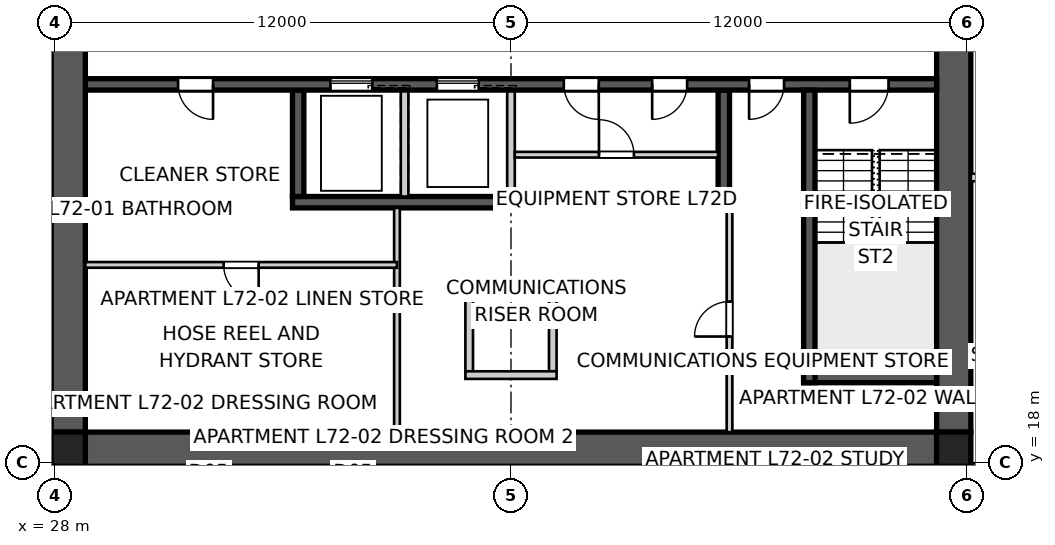
"""IFC4 building model, lengths in metres.
Left out: names, types, materials, properties, quantities, classifications, styles, units other than length and angle.
Written with IfcOpenShell. Run it as: python <this file> out.ifc"""

import sys

from ifc_helpers import new_model, si_unit, direction, frame, frame_2d, origin, origin_2d, place, context, subcontext, project, spatial, polyline, rectangle, outline, extrude, element, fill, save


model = new_model("IFC4")
c1 = context("Model", 3, precision=1e-05, world=origin(), true_north=direction((0.0, 1.0)))
c2 = subcontext(c1, "Body", "Model", "MODEL_VIEW")
j1 = project(units=[si_unit("LENGTHUNIT", "METRE"), si_unit("PLANEANGLEUNIT", "RADIAN")], contexts=[c1])
p1 = place(None, origin())
s1 = spatial("IfcSite", under=j1, at=p1, CompositionType="ELEMENT")
p2 = place(p1, origin())
s2 = spatial("IfcBuilding", under=s1, at=p2, CompositionType="ELEMENT")
p3 = place(p2, frame((0.0, 0.0, 260.8)))
s3 = spatial("IfcBuildingStorey", under=s2, at=p3, CompositionType="ELEMENT", Elevation=260.8)
p4 = place(p3, frame((51.2, 18.35, 0.0), z_axis=(0.0, 0.0, 1.0), x_axis=(-1.0, 0.0, 0.0)))
e1 = element("IfcWall", 1, at=p4, inside=s3, PredefinedType="SHEAR", context=c2, shape_type="SweptSolid", body=[
    extrude(outline(polyline([(0.0, -0.45), (22.4, -0.45), (22.4, -0.025), (22.85, -0.025), (22.85, 0.025), (22.4, 0.025), (22.4, 0.45), (0.0, 0.45), (0.0, 0.025), (-0.45, 0.025), (-0.45, -0.025), (0.0, -0.025), (0.0, -0.45)])), origin(), (0.0, 0.0, 1.0), 3.4),
])
p5 = place(p3, frame((51.65, 18.8, 0.0), z_axis=(0.0, 0.0, 1.0), x_axis=(0.0, 1.0, 0.0)))
e2 = element("IfcWall", 2, at=p5, inside=s3, PredefinedType="SHEAR", context=c2, shape_type="SweptSolid", body=[
    extrude(outline(polyline([(0.0, -0.45), (22.4, -0.45), (22.4, -0.025), (22.85, -0.025), (22.85, 0.025), (22.4, 0.025), (22.4, 0.45), (0.0, 0.45), (0.0, 0.025), (-0.45, 0.025), (-0.45, -0.025), (0.0, -0.025), (0.0, -0.45)])), origin(), (0.0, 0.0, 1.0), 3.4),
])
p6 = place(p5, frame((11.14, 0.0, 0.0)))
e3 = element("IfcOpeningElement", 3, at=p6, cuts=e2, PredefinedType="OPENING", context=c2, shape_type="SweptSolid", body=[
    extrude(rectangle(XDim=1.02, YDim=2.4, at=frame_2d((0.51, 1.2))), frame((0.0, 0.46, 0.0), z_axis=(0.0, -1.0, 0.0), x_axis=(1.0, 0.0, 0.0)), (0.0, 0.0, 1.0), 0.92),
])
p7 = place(p3, frame((28.35, 41.2, 0.0), z_axis=(0.0, 0.0, 1.0), x_axis=(0.0, -1.0, 0.0)))
e4 = element("IfcWall", 4, at=p7, inside=s3, PredefinedType="SHEAR", context=c2, shape_type="SweptSolid", body=[
    extrude(outline(polyline([(0.0, -0.45), (22.4, -0.45), (22.4, -0.025), (22.85, -0.025), (22.85, 0.025), (22.4, 0.025), (22.4, 0.45), (0.0, 0.45), (0.0, 0.025), (-0.45, 0.025), (-0.45, -0.025), (0.0, -0.025), (0.0, -0.45)])), origin(), (0.0, 0.0, 1.0), 3.4),
])
p8 = place(p7, frame((11.14, 0.0, 0.0)))
e5 = element("IfcOpeningElement", 5, at=p8, cuts=e4, PredefinedType="OPENING", context=c2, shape_type="SweptSolid", body=[
    extrude(rectangle(XDim=1.02, YDim=2.4, at=frame_2d((0.51, 1.2))), frame((0.0, 0.46, 0.0), z_axis=(0.0, -1.0, 0.0), x_axis=(1.0, 0.0, 0.0)), (0.0, 0.0, 1.0), 0.92),
])
p9 = place(p3, frame((51.2, 27.95, 0.0), z_axis=(0.0, 0.0, 1.0), x_axis=(-1.0, 0.0, 0.0)))
e6 = element("IfcWall", 6, at=p9, inside=s3, PredefinedType="SHEAR", context=c2, shape_type="SweptSolid", body=[
    extrude(rectangle(XDim=22.4, YDim=0.3, at=frame_2d((11.2, 0.0))), origin(), (0.0, 0.0, 1.0), 3.4),
])
p10 = place(p9, frame((19.04, 0.0, 0.0)))
e7 = element("IfcOpeningElement", 7, at=p10, cuts=e6, PredefinedType="OPENING", context=c2, shape_type="SweptSolid", body=[
    extrude(rectangle(XDim=0.92, YDim=2.1, at=frame_2d((0.46, 1.05))), frame((0.0, 0.16, 0.0), z_axis=(0.0, -1.0, 0.0), x_axis=(1.0, 0.0, 0.0)), (0.0, 0.0, 1.0), 0.32),
])
p11 = place(p9, frame((1.265, 0.0, 0.0)))
e8 = element("IfcOpeningElement", 8, at=p11, cuts=e6, PredefinedType="OPENING", context=c2, shape_type="SweptSolid", body=[
    extrude(rectangle(XDim=1.02, YDim=2.1, at=frame_2d((0.51, 1.05))), frame((0.0, 0.16, 0.0), z_axis=(0.0, -1.0, 0.0), x_axis=(1.0, 0.0, 0.0)), (0.0, 0.0, 1.0), 0.32),
])
p12 = place(p9, frame((4.015, 0.0, 0.0)))
e9 = element("IfcOpeningElement", 9, at=p12, cuts=e6, PredefinedType="OPENING", context=c2, shape_type="SweptSolid", body=[
    extrude(rectangle(XDim=0.92, YDim=2.1, at=frame_2d((0.46, 1.05))), frame((0.0, 0.16, 0.0), z_axis=(0.0, -1.0, 0.0), x_axis=(1.0, 0.0, 0.0)), (0.0, 0.0, 1.0), 0.32),
])
p13 = place(p9, frame((8.89, 0.0, 0.0)))
e10 = element("IfcOpeningElement", 10, at=p13, cuts=e6, PredefinedType="OPENING", context=c2, shape_type="SweptSolid", body=[
    extrude(rectangle(XDim=0.92, YDim=2.1, at=frame_2d((0.46, 1.05))), frame((0.0, 0.16, 0.0), z_axis=(0.0, -1.0, 0.0), x_axis=(1.0, 0.0, 0.0)), (0.0, 0.0, 1.0), 0.32),
])
p14 = place(p9, frame((6.565, 0.0, 0.0)))
e11 = element("IfcOpeningElement", 11, at=p14, cuts=e6, PredefinedType="OPENING", context=c2, shape_type="SweptSolid", body=[
    extrude(rectangle(XDim=0.92, YDim=2.1, at=frame_2d((0.46, 1.05))), frame((0.0, 0.16, 0.0), z_axis=(0.0, -1.0, 0.0), x_axis=(1.0, 0.0, 0.0)), (0.0, 0.0, 1.0), 0.32),
])
p15 = place(p9, frame((12.05, 0.0, 0.0)))
e12 = element("IfcOpeningElement", 12, at=p15, cuts=e6, PredefinedType="OPENING", context=c2, shape_type="SweptSolid", body=[
    extrude(rectangle(XDim=1.1, YDim=2.1, at=frame_2d((0.55, 1.05))), frame((0.0, 0.16, 0.0), z_axis=(0.0, -1.0, 0.0), x_axis=(1.0, 0.0, 0.0)), (0.0, 0.0, 1.0), 0.32),
])
p16 = place(p9, frame((14.85, 0.0, 0.0)))
e13 = element("IfcOpeningElement", 13, at=p16, cuts=e6, PredefinedType="OPENING", context=c2, shape_type="SweptSolid", body=[
    extrude(rectangle(XDim=1.1, YDim=2.1, at=frame_2d((0.55, 1.05))), frame((0.0, 0.16, 0.0), z_axis=(0.0, -1.0, 0.0), x_axis=(1.0, 0.0, 0.0)), (0.0, 0.0, 1.0), 0.32),
])
p17 = place(p3, frame((45.75, 24.85, 0.0), z_axis=(0.0, 0.0, 1.0), x_axis=(-1.0, 0.0, 0.0)))
e14 = element("IfcWall", 14, at=p17, inside=s3, PredefinedType="SHEAR", context=c2, shape_type="SweptSolid", body=[
    extrude(rectangle(XDim=11.5, YDim=0.3, at=frame_2d((5.75, 0.0))), origin(), (0.0, 0.0, 1.0), 3.4),
])
p18 = place(p3, frame((45.6, 27.8, 0.0), z_axis=(0.0, 0.0, 1.0), x_axis=(0.0, -1.0, 0.0)))
e15 = element("IfcWall", 15, at=p18, inside=s3, PredefinedType="SHEAR", context=c2, shape_type="SweptSolid", body=[
    extrude(rectangle(XDim=2.8, YDim=0.3, at=frame_2d((1.4, 0.0))), origin(), (0.0, 0.0, 1.0), 3.4),
])
for number, where, z_axis, x_axis in (
    (16, (40.0, 27.8, 0.0), (0.0, 0.0, 1.0), (0.0, -1.0, 0.0)),
    (17, (37.2, 27.8, 0.0), (0.0, 0.0, 1.0), (0.0, -1.0, 0.0)),
):
    element("IfcWall", number, at=place(p3, frame(where, z_axis=z_axis, x_axis=x_axis)), inside=s3, PredefinedType="SOLIDWALL", context=c2, shape_type="SweptSolid", body=[
        extrude(rectangle(XDim=2.8, YDim=0.2, at=frame_2d((1.4, 0.0))), origin(), (0.0, 0.0, 1.0), 3.4),
    ])
p19 = place(p3, frame((34.4, 27.8, 0.0), z_axis=(0.0, 0.0, 1.0), x_axis=(0.0, -1.0, 0.0)))
e18 = element("IfcWall", 18, at=p19, inside=s3, PredefinedType="SHEAR", context=c2, shape_type="SweptSolid", body=[
    extrude(rectangle(XDim=2.8, YDim=0.3, at=frame_2d((1.4, 0.0))), origin(), (0.0, 0.0, 1.0), 3.4),
])
p20 = place(p3, frame((47.85, 27.8, 0.0), z_axis=(0.0, 0.0, 1.0), x_axis=(0.0, -1.0, 0.0)))
e19 = element("IfcWall", 19, at=p20, inside=s3, PredefinedType="SHEAR", context=c2, shape_type="SweptSolid", body=[
    extrude(rectangle(XDim=7.7, YDim=0.3, at=frame_2d((3.85, 0.0))), origin(), (0.0, 0.0, 1.0), 3.4),
])
p21 = place(p3, frame((51.2, 20.25, 0.0), z_axis=(0.0, 0.0, 1.0), x_axis=(-1.0, 0.0, 0.0)))
e20 = element("IfcWall", 20, at=p21, inside=s3, PredefinedType="SHEAR", context=c2, shape_type="SweptSolid", body=[
    extrude(rectangle(XDim=3.5, YDim=0.3, at=frame_2d((1.75, 0.0))), origin(), (0.0, 0.0, 1.0), 3.4),
])
for number, where, z_axis, x_axis in (
    (21, (38.9, 22.4, 0.0), (0.0, 0.0, 1.0), (0.0, -1.0, 0.0)),
    (22, (41.1, 22.4, 0.0), (0.0, 0.0, 1.0), (0.0, -1.0, 0.0)),
):
    element("IfcWall", number, at=place(p3, frame(where, z_axis=z_axis, x_axis=x_axis)), inside=s3, PredefinedType="SOLIDWALL", context=c2, shape_type="SweptSolid", body=[
        extrude(rectangle(XDim=2.0, YDim=0.2, at=frame_2d((1.0, 0.0))), origin(), (0.0, 0.0, 1.0), 3.4),
    ])
for number, where, z_axis, x_axis in (
    (23, (38.8, 22.5, 0.0), (0.0, 0.0, 1.0), (1.0, 0.0, 0.0)),
    (24, (38.8, 20.3, 0.0), (0.0, 0.0, 1.0), (1.0, 0.0, 0.0)),
):
    element("IfcWall", number, at=place(p3, frame(where, z_axis=z_axis, x_axis=x_axis)), inside=s3, PredefinedType="SOLIDWALL", context=c2, shape_type="SweptSolid", body=[
        extrude(rectangle(XDim=2.4, YDim=0.2, at=frame_2d((1.2, 0.0))), origin(), (0.0, 0.0, 1.0), 3.4),
    ])
for number, where, z_axis, x_axis in (
    (25, (28.35, 18.35, 0.0), (0.0, 0.0, 1.0), (1.0, 0.0, 0.0)),
    (26, (51.65, 18.35, 0.0), (0.0, 0.0, 1.0), (1.0, 0.0, 0.0)),
):
    element("IfcColumn", number, at=place(p3, frame(where, z_axis=z_axis, x_axis=x_axis)), inside=s3, PredefinedType="COLUMN", context=c2, shape_type="SweptSolid", body=[
        extrude(rectangle(XDim=0.9, YDim=0.9, at=origin_2d()), origin(), (0.0, 0.0, 1.0), 3.4),
    ])
p22 = place(p3, frame((52.1, 25.5, 0.0), z_axis=(0.0, 0.0, 1.0), x_axis=(1.0, 0.0, 0.0)))
e27 = element("IfcWall", 27, at=p22, inside=s3, PredefinedType="PARTITIONING", context=c2, shape_type="SweptSolid", body=[
    extrude(rectangle(XDim=2.5, YDim=0.2, at=frame_2d((1.25, 0.0))), origin(), (0.0, 0.0, 1.0), 3.25),
])
p23 = place(p3, frame((22.388, 17.668, 0.0), z_axis=(0.0, 0.0, 1.0), x_axis=(0.819161528122, 0.573562891796, 0.0)))
e28 = element("IfcWall", 28, at=p23, inside=s3, PredefinedType="PARTITIONING", context=c2, shape_type="SweptSolid", body=[
    extrude(rectangle(XDim=6.681, YDim=0.25, at=frame_2d((3.341, 0.0))), origin(), (0.0, 0.0, 1.0), 3.25),
])
p24 = place(p3, frame((45.75, 18.8, 0.0), z_axis=(0.0, 0.0, 1.0), x_axis=(0.0, 1.0, 0.0)))
e29 = element("IfcWall", 29, at=p24, inside=s3, PredefinedType="SOLIDWALL", context=c2, shape_type="SweptSolid", body=[
    extrude(rectangle(XDim=5.95, YDim=0.15, at=frame_2d((2.975, 0.0))), origin(), (0.0, 0.0, 1.0), 3.25),
])
p25 = place(p24, frame((2.515, 0.0, 0.0)))
e30 = element("IfcOpeningElement", 30, at=p25, cuts=e29, PredefinedType="OPENING", context=c2, shape_type="SweptSolid", body=[
    extrude(rectangle(XDim=0.92, YDim=2.1, at=frame_2d((0.46, 1.05))), frame((0.0, 0.085, 0.0), z_axis=(0.0, -1.0, 0.0), x_axis=(1.0, 0.0, 0.0)), (0.0, 0.0, 1.0), 0.17),
])
p26 = place(p3, frame((37.0, 18.8, 0.0), z_axis=(0.0, 0.0, 1.0), x_axis=(0.0, 1.0, 0.0)))
e31 = element("IfcWall", 31, at=p26, inside=s3, PredefinedType="SOLIDWALL", context=c2, shape_type="SweptSolid", body=[
    extrude(rectangle(XDim=5.9, YDim=0.15, at=frame_2d((2.95, 0.0))), origin(), (0.0, 0.0, 1.0), 3.25),
])
p27 = place(p3, frame((37.0, 23.2, 0.0), z_axis=(0.0, 0.0, 1.0), x_axis=(-1.0, 0.0, 0.0)))
e32 = element("IfcWall", 32, at=p27, inside=s3, PredefinedType="SOLIDWALL", context=c2, shape_type="SweptSolid", body=[
    extrude(rectangle(XDim=8.2, YDim=0.15, at=frame_2d((4.1, 0.0))), origin(), (0.0, 0.0, 1.0), 3.25),
])
p28 = place(p27, frame((3.64, 0.0, 0.0)))
e33 = element("IfcOpeningElement", 33, at=p28, cuts=e32, PredefinedType="OPENING", context=c2, shape_type="SweptSolid", body=[
    extrude(rectangle(XDim=0.92, YDim=2.1, at=frame_2d((0.46, 1.05))), frame((0.0, 0.085, 0.0), z_axis=(0.0, -1.0, 0.0), x_axis=(1.0, 0.0, 0.0)), (0.0, 0.0, 1.0), 0.17),
])
p29 = place(p3, frame((24.437, 14.812, 0.0), z_axis=(0.0, 0.0, 1.0), x_axis=(0.819157353031, 0.573568854608, 0.0)))
e34 = element("IfcWall", 34, at=p29, inside=s3, PredefinedType="PARTITIONING", context=c2, shape_type="SweptSolid", body=[
    extrude(rectangle(XDim=5.384, YDim=0.12, at=frame_2d((2.692, 0.0))), origin(), (0.0, 0.0, 1.0), 3.25),
])
p30 = place(p29, frame((2.192, 0.0, 0.0)))
e35 = element("IfcOpeningElement", 35, at=p30, cuts=e34, PredefinedType="OPENING", context=c2, shape_type="SweptSolid", body=[
    extrude(rectangle(XDim=0.96, YDim=2.1, at=frame_2d((0.48, 1.05))), frame((0.0, 0.07, 0.0), z_axis=(0.0, -1.0, 0.0), x_axis=(1.0, 0.0, 0.0)), (0.0, 0.0, 1.0), 0.14),
])
p31 = place(p3, frame((52.05, 17.9, 0.0), z_axis=(0.0, 0.0, 1.0), x_axis=(1.0, 0.0, 0.0)))
e36 = element("IfcWall", 36, at=p31, inside=s3, PredefinedType="SOLIDWALL", context=c2, shape_type="SweptSolid", body=[
    extrude(rectangle(XDim=0.444, YDim=0.15, at=frame_2d((0.222, 0.0))), origin(), (0.0, 0.0, 1.0), 3.25),
])
p32 = place(p3, frame((40.1, 26.1, 0.0), z_axis=(0.0, 0.0, 1.0), x_axis=(1.0, 0.0, 0.0)))
e37 = element("IfcWall", 37, at=p32, inside=s3, PredefinedType="SOLIDWALL", context=c2, shape_type="SweptSolid", body=[
    extrude(rectangle(XDim=5.35, YDim=0.15, at=frame_2d((2.675, 0.0))), origin(), (0.0, 0.0, 1.0), 3.25),
])
p33 = place(p32, frame((2.215, 0.0, 0.0)))
e38 = element("IfcOpeningElement", 38, at=p33, cuts=e37, PredefinedType="OPENING", context=c2, shape_type="SweptSolid", body=[
    extrude(rectangle(XDim=0.92, YDim=2.1, at=frame_2d((0.46, 1.05))), frame((0.0, 0.085, 0.0), z_axis=(0.0, -1.0, 0.0), x_axis=(1.0, 0.0, 0.0)), (0.0, 0.0, 1.0), 0.17),
])
p34 = place(p10, origin())
e39 = element("IfcDoor", 39, at=p34, inside=s3, OperationType="SINGLE_SWING_LEFT", PredefinedType="DOOR", context=c2, shape_type="SweptSolid", body=[
    extrude(rectangle(XDim=0.92, YDim=2.1, at=frame_2d((0.46, 1.05))), frame((0.0, 0.025, 0.0), z_axis=(0.0, -1.0, 0.0), x_axis=(1.0, 0.0, 0.0)), (0.0, 0.0, 1.0), 0.05),
])
fill(e7, e39)
p35 = place(p11, origin())
e40 = element("IfcDoor", 40, at=p35, inside=s3, OperationType="SINGLE_SWING_RIGHT", PredefinedType="DOOR", context=c2, shape_type="SweptSolid", body=[
    extrude(rectangle(XDim=1.02, YDim=2.1, at=frame_2d((0.51, 1.05))), frame((0.0, 0.025, 0.0), z_axis=(0.0, -1.0, 0.0), x_axis=(1.0, 0.0, 0.0)), (0.0, 0.0, 1.0), 0.05),
])
fill(e8, e40)
p36 = place(p12, origin())
e41 = element("IfcDoor", 41, at=p36, inside=s3, OperationType="SINGLE_SWING_RIGHT", PredefinedType="DOOR", context=c2, shape_type="SweptSolid", body=[
    extrude(rectangle(XDim=0.92, YDim=2.1, at=frame_2d((0.46, 1.05))), frame((0.0, 0.025, 0.0), z_axis=(0.0, -1.0, 0.0), x_axis=(1.0, 0.0, 0.0)), (0.0, 0.0, 1.0), 0.05),
])
fill(e9, e41)
p37 = place(p28, origin())
e42 = element("IfcDoor", 42, at=p37, inside=s3, OperationType="SINGLE_SWING_LEFT", PredefinedType="DOOR", context=c2, shape_type="SweptSolid", body=[
    extrude(rectangle(XDim=0.92, YDim=2.1, at=frame_2d((0.46, 1.05))), frame((0.0, 0.025, 0.0), z_axis=(0.0, -1.0, 0.0), x_axis=(1.0, 0.0, 0.0)), (0.0, 0.0, 1.0), 0.05),
])
fill(e33, e42)
p38 = place(p25, origin())
e43 = element("IfcDoor", 43, at=p38, inside=s3, OperationType="SINGLE_SWING_LEFT", PredefinedType="DOOR", context=c2, shape_type="SweptSolid", body=[
    extrude(rectangle(XDim=0.92, YDim=2.1, at=frame_2d((0.46, 1.05))), frame((0.0, 0.025, 0.0), z_axis=(0.0, -1.0, 0.0), x_axis=(1.0, 0.0, 0.0)), (0.0, 0.0, 1.0), 0.05),
])
fill(e30, e43)
p39 = place(p13, origin())
e44 = element("IfcDoor", 44, at=p39, inside=s3, OperationType="SINGLE_SWING_LEFT", PredefinedType="DOOR", context=c2, shape_type="SweptSolid", body=[
    extrude(rectangle(XDim=0.92, YDim=2.1, at=frame_2d((0.46, 1.05))), frame((0.0, 0.025, 0.0), z_axis=(0.0, -1.0, 0.0), x_axis=(1.0, 0.0, 0.0)), (0.0, 0.0, 1.0), 0.05),
])
fill(e10, e44)
p40 = place(p14, origin())
e45 = element("IfcDoor", 45, at=p40, inside=s3, OperationType="SINGLE_SWING_RIGHT", PredefinedType="DOOR", context=c2, shape_type="SweptSolid", body=[
    extrude(rectangle(XDim=0.92, YDim=2.1, at=frame_2d((0.46, 1.05))), frame((0.0, 0.025, 0.0), z_axis=(0.0, -1.0, 0.0), x_axis=(1.0, 0.0, 0.0)), (0.0, 0.0, 1.0), 0.05),
])
fill(e11, e45)
p41 = place(p33, origin())
e46 = element("IfcDoor", 46, at=p41, inside=s3, OperationType="SINGLE_SWING_LEFT", PredefinedType="DOOR", context=c2, shape_type="SweptSolid", body=[
    extrude(rectangle(XDim=0.92, YDim=2.1, at=frame_2d((0.46, 1.05))), frame((0.0, 0.025, 0.0), z_axis=(0.0, -1.0, 0.0), x_axis=(1.0, 0.0, 0.0)), (0.0, 0.0, 1.0), 0.05),
])
fill(e38, e46)
p42 = place(p15, origin())
e47 = element("IfcDoor", 47, at=p42, inside=s3, OperationType="SLIDING_TO_LEFT", PredefinedType="DOOR", context=c2, shape_type="SweptSolid", body=[
    extrude(rectangle(XDim=1.1, YDim=2.1, at=frame_2d((0.55, 1.05))), frame((0.0, 0.025, 0.0), z_axis=(0.0, -1.0, 0.0), x_axis=(1.0, 0.0, 0.0)), (0.0, 0.0, 1.0), 0.05),
])
fill(e12, e47)
p43 = place(p16, origin())
e48 = element("IfcDoor", 48, at=p43, inside=s3, OperationType="SLIDING_TO_LEFT", PredefinedType="DOOR", context=c2, shape_type="SweptSolid", body=[
    extrude(rectangle(XDim=1.1, YDim=2.1, at=frame_2d((0.55, 1.05))), frame((0.0, 0.025, 0.0), z_axis=(0.0, -1.0, 0.0), x_axis=(1.0, 0.0, 0.0)), (0.0, 0.0, 1.0), 0.05),
])
fill(e13, e48)
save(model, sys.argv[1])
